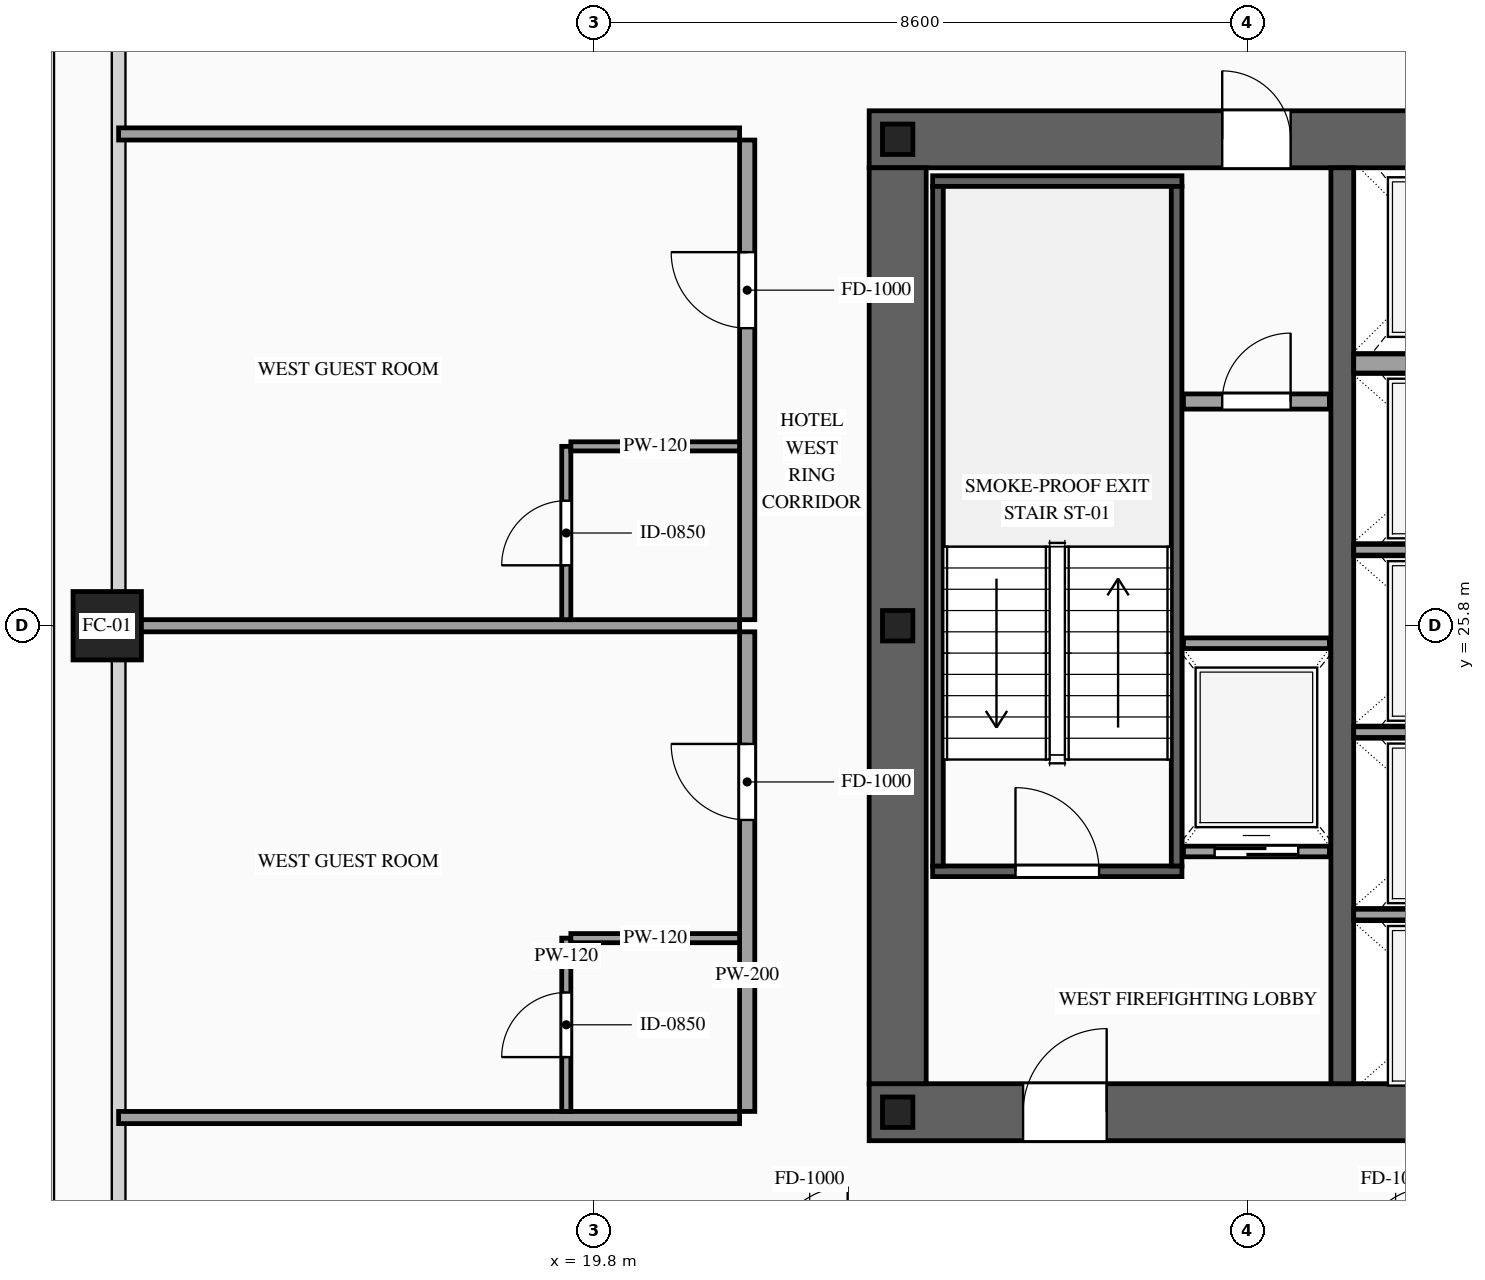
"""IFC4 building model, lengths in metres.
Left out: names, types, materials, properties, quantities, classifications, styles, units other than length and angle.
Written with IfcOpenShell. Run it as: python <this file> out.ifc"""

import sys

from ifc_helpers import new_model, si_unit, direction, frame, frame_2d, origin, origin_2d, place, context, subcontext, project, spatial, rectangle, hollow_rectangle, i_section, extrude, source, transform, mapped, element, fill, save


model = new_model("IFC4")
c1 = context("Model", 3, precision=1e-05, world=origin(), true_north=direction((0.0, 1.0)))
c2 = subcontext(c1, "Body", "Model", "MODEL_VIEW")
j1 = project(units=[si_unit("LENGTHUNIT", "METRE"), si_unit("PLANEANGLEUNIT", "RADIAN")], contexts=[c1])
p1 = place(None, origin())
s1 = spatial("IfcSite", under=j1, at=p1, CompositionType="ELEMENT")
p2 = place(p1, origin())
s2 = spatial("IfcBuilding", under=s1, at=p2, CompositionType="ELEMENT")
p3 = place(p2, frame((0.0, 0.0, 138.0)))
s3 = spatial("IfcBuildingStorey", under=s2, at=p3, CompositionType="ELEMENT", Elevation=138.0)
p4 = place(p3, frame((23.425, 19.4, 0.0), z_axis=(0.0, 0.0, 1.0), x_axis=(1.0, 0.0, 0.0)))
e1 = element("IfcWall", 1, at=p4, inside=s3, PredefinedType="SHEAR", context=c2, shape_type="SweptSolid", body=[
    extrude(rectangle(XDim=27.15, YDim=0.75, at=frame_2d((13.575, 0.0))), origin(), (0.0, 0.0, 1.0), 3.6),
])
p5 = place(p4, frame((2.025, 0.0, 0.0)))
e2 = element("IfcOpeningElement", 2, at=p5, cuts=e1, PredefinedType="OPENING", context=c2, shape_type="SweptSolid", body=[
    extrude(rectangle(XDim=1.1, YDim=2.2, at=frame_2d((0.55, 1.1))), frame((0.0, 0.39, 0.0), z_axis=(0.0, -1.0, 0.0), x_axis=(1.0, 0.0, 0.0)), (0.0, 0.0, 1.0), 0.78),
])
p6 = place(p4, frame((9.925, 0.0, 0.0)))
e3 = element("IfcOpeningElement", 3, at=p6, cuts=e1, PredefinedType="OPENING", context=c2, shape_type="SweptSolid", body=[
    extrude(rectangle(XDim=1.1, YDim=2.2, at=frame_2d((0.55, 1.1))), frame((0.0, 0.39, 0.0), z_axis=(0.0, -1.0, 0.0), x_axis=(1.0, 0.0, 0.0)), (0.0, 0.0, 1.0), 0.78),
])
p7 = place(p4, frame((23.125, 0.0, 0.0)))
e4 = element("IfcOpeningElement", 4, at=p7, cuts=e1, PredefinedType="OPENING", context=c2, shape_type="SweptSolid", body=[
    extrude(rectangle(XDim=1.1, YDim=2.2, at=frame_2d((0.55, 1.1))), frame((0.0, 0.39, 0.0), z_axis=(0.0, -1.0, 0.0), x_axis=(1.0, 0.0, 0.0)), (0.0, 0.0, 1.0), 0.78),
])
p8 = place(p4, frame((19.745, 0.0, 0.0)))
e5 = element("IfcOpeningElement", 5, at=p8, cuts=e1, PredefinedType="OPENING", context=c2, shape_type="SweptSolid", body=[
    extrude(rectangle(XDim=0.9, YDim=2.15, at=frame_2d((0.45, 1.075))), frame((0.0, 0.39, 0.0), z_axis=(0.0, -1.0, 0.0), x_axis=(1.0, 0.0, 0.0)), (0.0, 0.0, 1.0), 0.78),
])
p9 = place(p4, frame((18.305, 0.0, 0.0)))
e6 = element("IfcOpeningElement", 6, at=p9, cuts=e1, PredefinedType="OPENING", context=c2, shape_type="SweptSolid", body=[
    extrude(rectangle(XDim=0.9, YDim=2.15, at=frame_2d((0.45, 1.075))), frame((0.0, 0.39, 0.0), z_axis=(0.0, -1.0, 0.0), x_axis=(1.0, 0.0, 0.0)), (0.0, 0.0, 1.0), 0.78),
])
p10 = place(p3, frame((23.425, 32.2, 0.0), z_axis=(0.0, 0.0, 1.0), x_axis=(1.0, 0.0, 0.0)))
e7 = element("IfcWall", 7, at=p10, inside=s3, PredefinedType="SHEAR", context=c2, shape_type="SweptSolid", body=[
    extrude(rectangle(XDim=27.15, YDim=0.75, at=frame_2d((13.575, 0.0))), origin(), (0.0, 0.0, 1.0), 3.6),
])
p11 = place(p10, frame((4.645, 0.0, 0.0)))
e8 = element("IfcOpeningElement", 8, at=p11, cuts=e7, PredefinedType="OPENING", context=c2, shape_type="SweptSolid", body=[
    extrude(rectangle(XDim=0.9, YDim=2.15, at=frame_2d((0.45, 1.075))), frame((0.0, 0.39, 0.0), z_axis=(0.0, -1.0, 0.0), x_axis=(1.0, 0.0, 0.0)), (0.0, 0.0, 1.0), 0.78),
])
p12 = place(p10, frame((9.925, 0.0, 0.0)))
e9 = element("IfcOpeningElement", 9, at=p12, cuts=e7, PredefinedType="OPENING", context=c2, shape_type="SweptSolid", body=[
    extrude(rectangle(XDim=1.1, YDim=2.2, at=frame_2d((0.55, 1.1))), frame((0.0, 0.39, 0.0), z_axis=(0.0, -1.0, 0.0), x_axis=(1.0, 0.0, 0.0)), (0.0, 0.0, 1.0), 0.78),
])
p13 = place(p10, frame((15.775, 0.0, 0.0)))
e10 = element("IfcOpeningElement", 10, at=p13, cuts=e7, PredefinedType="OPENING", context=c2, shape_type="SweptSolid", body=[
    extrude(rectangle(XDim=1.1, YDim=2.2, at=frame_2d((0.55, 1.1))), frame((0.0, 0.39, 0.0), z_axis=(0.0, -1.0, 0.0), x_axis=(1.0, 0.0, 0.0)), (0.0, 0.0, 1.0), 0.78),
])
p14 = place(p10, frame((18.975, 0.0, 0.0)))
e11 = element("IfcOpeningElement", 11, at=p14, cuts=e7, PredefinedType="OPENING", context=c2, shape_type="SweptSolid", body=[
    extrude(rectangle(XDim=0.9, YDim=2.15, at=frame_2d((0.45, 1.075))), frame((0.0, 0.39, 0.0), z_axis=(0.0, -1.0, 0.0), x_axis=(1.0, 0.0, 0.0)), (0.0, 0.0, 1.0), 0.78),
])
m1 = source(origin(), c2, "Body", "SweptSolid", [
    extrude(rectangle(XDim=12.05, YDim=0.75, at=frame_2d((6.025, 0.0))), origin(), (0.0, 0.0, 1.0), 3.6),
])
p15 = place(p3, frame((23.8, 19.775, 0.0), z_axis=(0.0, 0.0, 1.0), x_axis=(0.0, 1.0, 0.0)))
e12 = element("IfcWall", 12, at=p15, inside=s3, PredefinedType="SHEAR", context=c2, shape_type="MappedRepresentation", body=[
    mapped(m1, transform((0.0, 0.0, 0.0), scale=1.0)),
])
m2 = source(origin(), c2, "Body", "SweptSolid", [
    extrude(rectangle(XDim=12.05, YDim=0.3, at=frame_2d((6.025, 0.0))), origin(), (0.0, 0.0, 1.0), 3.6),
])
p16 = place(p3, frame((29.65, 19.775, 0.0), z_axis=(0.0, 0.0, 1.0), x_axis=(0.0, 1.0, 0.0)))
e13 = element("IfcWall", 13, at=p16, inside=s3, PredefinedType="SOLIDWALL", context=c2, shape_type="MappedRepresentation", body=[
    mapped(m2, transform((0.0, 0.0, 0.0), scale=1.0)),
])
m3 = source(origin(), c2, "Body", "SweptSolid", [
    extrude(i_section(OverallWidth=0.4, OverallDepth=0.4, WebThickness=0.013, FlangeThickness=0.021, at=origin_2d()), origin(), (0.0, 0.0, 1.0), 3.6),
])
for number, where, z_axis, x_axis in (
    (14, (23.8, 19.4, 0.0), (0.0, 0.0, 1.0), (1.0, 0.0, 0.0)),
    (15, (23.8, 25.8, 0.0), (0.0, 0.0, 1.0), (1.0, 0.0, 0.0)),
    (16, (23.8, 32.2, 0.0), (0.0, 0.0, 1.0), (1.0, 0.0, 0.0)),
):
    element("IfcColumn", number, at=place(p3, frame(where, z_axis=z_axis, x_axis=x_axis)), inside=s3, PredefinedType="COLUMN", context=c2, shape_type="MappedRepresentation", body=[
        mapped(m3, transform((0.0, 0.0, 0.0), scale=1.0)),
    ])
m4 = source(origin(), c2, "Body", "SweptSolid", [
    extrude(hollow_rectangle(XDim=0.9, YDim=0.9, WallThickness=0.042, at=origin_2d()), origin(), (0.0, 0.0, 1.0), 3.6),
])
p17 = place(p3, frame((13.4, 25.8, 0.0), z_axis=(0.0, 0.0, 1.0), x_axis=(1.0, 0.0, 0.0)))
e17 = element("IfcColumn", 17, at=p17, inside=s3, PredefinedType="COLUMN", context=c2, shape_type="MappedRepresentation", body=[
    mapped(m4, transform((0.0, 0.0, 0.0), scale=1.0)),
])
p18 = place(p3, frame((27.56, 22.83, 0.0), z_axis=(0.0, 0.0, 1.0), x_axis=(1.0, 0.0, 0.0)))
e18 = element("IfcWall", 18, at=p18, inside=s3, PredefinedType="SOLIDWALL", context=c2, shape_type="SweptSolid", body=[
    extrude(rectangle(XDim=1.92, YDim=0.14, at=frame_2d((0.96, 0.0))), origin(), (0.0, 0.0, 1.0), 3.38),
])
p19 = place(p18, frame((0.41, 0.0, 0.0)))
e19 = element("IfcOpeningElement", 19, at=p19, cuts=e18, PredefinedType="OPENING", context=c2, shape_type="SweptSolid", body=[
    extrude(rectangle(XDim=1.1, YDim=2.2, at=frame_2d((0.55, 1.1))), frame((0.0, 0.085, 0.0), z_axis=(0.0, -1.0, 0.0), x_axis=(1.0, 0.0, 0.0)), (0.0, 0.0, 1.0), 0.17),
])
m5 = source(origin(), c2, "Body", "SweptSolid", [
    extrude(rectangle(XDim=1.92, YDim=0.14, at=frame_2d((0.96, 0.0))), origin(), (0.0, 0.0, 1.0), 3.38),
])
p20 = place(p3, frame((27.56, 25.57, 0.0), z_axis=(0.0, 0.0, 1.0), x_axis=(1.0, 0.0, 0.0)))
e20 = element("IfcWall", 20, at=p20, inside=s3, PredefinedType="SOLIDWALL", context=c2, shape_type="MappedRepresentation", body=[
    mapped(m5, transform((0.0, 0.0, 0.0), scale=1.0)),
])
m6 = source(origin(), c2, "Body", "SweptSolid", [
    extrude(rectangle(XDim=2.5, YDim=0.14, at=frame_2d((1.25, 0.0))), origin(), (0.0, 0.0, 1.0), 3.38),
])
for number, where, z_axis, x_axis in (
    (21, (29.8, 22.0, 0.0), (0.0, 0.0, 1.0), (1.0, 0.0, 0.0)),
    (22, (29.8, 24.4, 0.0), (0.0, 0.0, 1.0), (1.0, 0.0, 0.0)),
    (23, (29.8, 26.8, 0.0), (0.0, 0.0, 1.0), (1.0, 0.0, 0.0)),
):
    element("IfcWall", number, at=place(p3, frame(where, z_axis=z_axis, x_axis=x_axis)), inside=s3, PredefinedType="SOLIDWALL", context=c2, shape_type="MappedRepresentation", body=[
        mapped(m6, transform((0.0, 0.0, 0.0), scale=1.0)),
    ])
m7 = source(origin(), c2, "Body", "SweptSolid", [
    extrude(rectangle(XDim=2.5, YDim=0.25, at=frame_2d((1.25, 0.0))), origin(), (0.0, 0.0, 1.0), 3.38),
])
p21 = place(p3, frame((29.8, 29.25, 0.0), z_axis=(0.0, 0.0, 1.0), x_axis=(1.0, 0.0, 0.0)))
e24 = element("IfcWall", 24, at=p21, inside=s3, PredefinedType="SOLIDWALL", context=c2, shape_type="MappedRepresentation", body=[
    mapped(m7, transform((0.0, 0.0, 0.0), scale=1.0)),
])
p22 = place(p3, frame((24.26, 22.57, 0.0), z_axis=(0.0, 0.0, 1.0), x_axis=(1.0, 0.0, 0.0)))
e25 = element("IfcWall", 25, at=p22, inside=s3, PredefinedType="SOLIDWALL", context=c2, shape_type="SweptSolid", body=[
    extrude(rectangle(XDim=3.28, YDim=0.14, at=frame_2d((1.64, 0.0))), origin(), (0.0, 0.0, 1.0), 3.38),
])
p23 = place(p22, frame((1.09, 0.0, 0.0)))
e26 = element("IfcOpeningElement", 26, at=p23, cuts=e25, PredefinedType="OPENING", context=c2, shape_type="SweptSolid", body=[
    extrude(rectangle(XDim=1.1, YDim=2.2, at=frame_2d((0.55, 1.1))), frame((0.0, 0.085, 0.0), z_axis=(0.0, -1.0, 0.0), x_axis=(1.0, 0.0, 0.0)), (0.0, 0.0, 1.0), 0.17),
])
m8 = source(origin(), c2, "Body", "SweptSolid", [
    extrude(rectangle(XDim=3.28, YDim=0.14, at=frame_2d((1.64, 0.0))), origin(), (0.0, 0.0, 1.0), 3.38),
])
p24 = place(p3, frame((24.26, 31.65, 0.0), z_axis=(0.0, 0.0, 1.0), x_axis=(1.0, 0.0, 0.0)))
e27 = element("IfcWall", 27, at=p24, inside=s3, PredefinedType="SOLIDWALL", context=c2, shape_type="MappedRepresentation", body=[
    mapped(m8, transform((0.0, 0.0, 0.0), scale=1.0)),
])
m9 = source(origin(), c2, "Body", "SweptSolid", [
    extrude(rectangle(XDim=8.94, YDim=0.14, at=frame_2d((4.47, 0.0))), origin(), (0.0, 0.0, 1.0), 3.38),
])
for number, where, z_axis, x_axis in (
    (28, (24.33, 22.64, 0.0), (0.0, 0.0, 1.0), (0.0, 1.0, 0.0)),
    (29, (27.47, 22.64, 0.0), (0.0, 0.0, 1.0), (0.0, 1.0, 0.0)),
):
    element("IfcWall", number, at=place(p3, frame(where, z_axis=z_axis, x_axis=x_axis)), inside=s3, PredefinedType="SOLIDWALL", context=c2, shape_type="MappedRepresentation", body=[
        mapped(m9, transform((0.0, 0.0, 0.0), scale=1.0)),
    ])
p25 = place(p3, frame((27.56, 28.75, 0.0), z_axis=(0.0, 0.0, 1.0), x_axis=(1.0, 0.0, 0.0)))
e30 = element("IfcWall", 30, at=p25, inside=s3, PredefinedType="PARTITIONING", context=c2, shape_type="SweptSolid", body=[
    extrude(rectangle(XDim=1.92, YDim=0.2, at=frame_2d((0.96, 0.0))), origin(), (0.0, 0.0, 1.0), 3.38),
])
p26 = place(p25, frame((0.51, 0.0, 0.0)))
e31 = element("IfcOpeningElement", 31, at=p26, cuts=e30, PredefinedType="OPENING", context=c2, shape_type="SweptSolid", body=[
    extrude(rectangle(XDim=0.9, YDim=2.15, at=frame_2d((0.45, 1.075))), frame((0.0, 0.115, 0.0), z_axis=(0.0, -1.0, 0.0), x_axis=(1.0, 0.0, 0.0)), (0.0, 0.0, 1.0), 0.23),
])
p27 = place(p3, frame((21.82, 19.41, 0.0), z_axis=(0.0, 0.0, 1.0), x_axis=(0.0, 1.0, 0.0)))
e32 = element("IfcWall", 32, at=p27, inside=s3, PredefinedType="PARTITIONING", context=c2, shape_type="SweptSolid", body=[
    extrude(rectangle(XDim=6.31, YDim=0.2, at=frame_2d((3.155, 0.0))), origin(), (0.0, 0.0, 1.0), 3.38),
])
p28 = place(p27, frame((3.835, 0.0, 0.0)))
e33 = element("IfcOpeningElement", 33, at=p28, cuts=e32, PredefinedType="OPENING", context=c2, shape_type="SweptSolid", body=[
    extrude(rectangle(XDim=1.0, YDim=2.2, at=frame_2d((0.5, 1.1))), frame((0.0, 0.115, 0.0), z_axis=(0.0, -1.0, 0.0), x_axis=(1.0, 0.0, 0.0)), (0.0, 0.0, 1.0), 0.23),
])
m10 = source(origin(), c2, "Body", "SweptSolid", [
    extrude(rectangle(XDim=8.17, YDim=0.16, at=frame_2d((4.085, 0.0))), origin(), (0.0, 0.0, 1.0), 2.675),
])
p29 = place(p3, frame((13.55, 25.8, 0.0), z_axis=(0.0, 0.0, 1.0), x_axis=(1.0, 0.0, 0.0)))
e34 = element("IfcWall", 34, at=p29, inside=s3, PredefinedType="PARTITIONING", context=c2, shape_type="MappedRepresentation", body=[
    mapped(m10, transform((0.0, 0.0, 0.0), scale=1.0)),
])
m11 = source(origin(), c2, "Body", "SweptSolid", [
    extrude(rectangle(XDim=8.17, YDim=0.16, at=frame_2d((4.085, 0.0))), origin(), (0.0, 0.0, 1.0), 2.875),
])
p30 = place(p3, frame((13.55, 19.33, 0.0), z_axis=(0.0, 0.0, 1.0), x_axis=(1.0, 0.0, 0.0)))
e35 = element("IfcWall", 35, at=p30, inside=s3, PredefinedType="PARTITIONING", context=c2, shape_type="MappedRepresentation", body=[
    mapped(m11, transform((0.0, 0.0, 0.0), scale=1.0)),
])
p31 = place(p3, frame((19.44, 19.41, 0.0), z_axis=(0.0, 0.0, 1.0), x_axis=(0.0, 1.0, 0.0)))
e36 = element("IfcWall", 36, at=p31, inside=s3, PredefinedType="PARTITIONING", context=c2, shape_type="SweptSolid", body=[
    extrude(rectangle(XDim=2.28, YDim=0.12, at=frame_2d((1.14, 0.0))), origin(), (0.0, 0.0, 1.0), 3.38),
])
p32 = place(p31, frame((0.715, 0.0, 0.0)))
e37 = element("IfcOpeningElement", 37, at=p32, cuts=e36, PredefinedType="OPENING", context=c2, shape_type="SweptSolid", body=[
    extrude(rectangle(XDim=0.85, YDim=2.1, at=frame_2d((0.425, 1.05))), frame((0.0, 0.075, 0.0), z_axis=(0.0, -1.0, 0.0), x_axis=(1.0, 0.0, 0.0)), (0.0, 0.0, 1.0), 0.15),
])
m12 = source(origin(), c2, "Body", "SweptSolid", [
    extrude(rectangle(XDim=2.22, YDim=0.12, at=frame_2d((1.11, 0.0))), origin(), (0.0, 0.0, 1.0), 3.38),
])
p33 = place(p3, frame((19.5, 21.69, 0.0), z_axis=(0.0, 0.0, 1.0), x_axis=(1.0, 0.0, 0.0)))
e38 = element("IfcWall", 38, at=p33, inside=s3, PredefinedType="PARTITIONING", context=c2, shape_type="MappedRepresentation", body=[
    mapped(m12, transform((0.0, 0.0, 0.0), scale=1.0)),
])
p34 = place(p3, frame((21.82, 25.88, 0.0), z_axis=(0.0, 0.0, 1.0), x_axis=(0.0, 1.0, 0.0)))
e39 = element("IfcWall", 39, at=p34, inside=s3, PredefinedType="PARTITIONING", context=c2, shape_type="SweptSolid", body=[
    extrude(rectangle(XDim=6.31, YDim=0.2, at=frame_2d((3.155, 0.0))), origin(), (0.0, 0.0, 1.0), 3.38),
])
p35 = place(p34, frame((3.835, 0.0, 0.0)))
e40 = element("IfcOpeningElement", 40, at=p35, cuts=e39, PredefinedType="OPENING", context=c2, shape_type="SweptSolid", body=[
    extrude(rectangle(XDim=1.0, YDim=2.2, at=frame_2d((0.5, 1.1))), frame((0.0, 0.115, 0.0), z_axis=(0.0, -1.0, 0.0), x_axis=(1.0, 0.0, 0.0)), (0.0, 0.0, 1.0), 0.23),
])
p36 = place(p3, frame((13.55, 32.27, 0.0), z_axis=(0.0, 0.0, 1.0), x_axis=(1.0, 0.0, 0.0)))
e41 = element("IfcWall", 41, at=p36, inside=s3, PredefinedType="PARTITIONING", context=c2, shape_type="MappedRepresentation", body=[
    mapped(m11, transform((0.0, 0.0, 0.0), scale=1.0)),
])
p37 = place(p3, frame((19.44, 25.88, 0.0), z_axis=(0.0, 0.0, 1.0), x_axis=(0.0, 1.0, 0.0)))
e42 = element("IfcWall", 42, at=p37, inside=s3, PredefinedType="PARTITIONING", context=c2, shape_type="SweptSolid", body=[
    extrude(rectangle(XDim=2.28, YDim=0.12, at=frame_2d((1.14, 0.0))), origin(), (0.0, 0.0, 1.0), 3.38),
])
p38 = place(p37, frame((0.715, 0.0, 0.0)))
e43 = element("IfcOpeningElement", 43, at=p38, cuts=e42, PredefinedType="OPENING", context=c2, shape_type="SweptSolid", body=[
    extrude(rectangle(XDim=0.85, YDim=2.1, at=frame_2d((0.425, 1.05))), frame((0.0, 0.075, 0.0), z_axis=(0.0, -1.0, 0.0), x_axis=(1.0, 0.0, 0.0)), (0.0, 0.0, 1.0), 0.15),
])
p39 = place(p3, frame((19.5, 28.16, 0.0), z_axis=(0.0, 0.0, 1.0), x_axis=(1.0, 0.0, 0.0)))
e44 = element("IfcWall", 44, at=p39, inside=s3, PredefinedType="PARTITIONING", context=c2, shape_type="MappedRepresentation", body=[
    mapped(m12, transform((0.0, 0.0, 0.0), scale=1.0)),
])
m13 = source(origin(), c2, "Body", "SweptSolid", [
    extrude(rectangle(XDim=1.1, YDim=2.2, at=frame_2d((0.55, 1.1))), frame((0.0, 0.025, 0.0), z_axis=(0.0, -1.0, 0.0), x_axis=(1.0, 0.0, 0.0)), (0.0, 0.0, 1.0), 0.05),
])
p40 = place(p19, origin())
e45 = element("IfcDoor", 45, at=p40, inside=s3, OperationType="SLIDING_TO_LEFT", PredefinedType="DOOR", context=c2, shape_type="MappedRepresentation", body=[
    mapped(m13, transform((0.0, 0.0, 0.0), scale=1.0)),
])
fill(e19, e45)
m14 = source(origin(), c2, "Body", "SweptSolid", [
    extrude(rectangle(XDim=1.1, YDim=2.2, at=frame_2d((0.55, 1.1))), frame((0.0, 0.025, 0.0), z_axis=(0.0, -1.0, 0.0), x_axis=(1.0, 0.0, 0.0)), (0.0, 0.0, 1.0), 0.05),
])
p41 = place(p23, origin())
e46 = element("IfcDoor", 46, at=p41, inside=s3, OperationType="SINGLE_SWING_LEFT", PredefinedType="DOOR", context=c2, shape_type="MappedRepresentation", body=[
    mapped(m14, transform((0.0, 0.0, 0.0), scale=1.0)),
])
fill(e26, e46)
p42 = place(p5, origin())
e47 = element("IfcDoor", 47, at=p42, inside=s3, OperationType="SINGLE_SWING_RIGHT", PredefinedType="DOOR", context=c2, shape_type="MappedRepresentation", body=[
    mapped(m14, transform((0.0, 0.0, 0.0), scale=1.0)),
])
fill(e2, e47)
m15 = source(origin(), c2, "Body", "SweptSolid", [
    extrude(rectangle(XDim=0.9, YDim=2.15, at=frame_2d((0.45, 1.075))), frame((0.0, 0.025, 0.0), z_axis=(0.0, -1.0, 0.0), x_axis=(1.0, 0.0, 0.0)), (0.0, 0.0, 1.0), 0.05),
])
p43 = place(p11, origin())
e48 = element("IfcDoor", 48, at=p43, inside=s3, OperationType="SINGLE_SWING_LEFT", PredefinedType="DOOR", context=c2, shape_type="MappedRepresentation", body=[
    mapped(m15, transform((0.0, 0.0, 0.0), scale=1.0)),
])
fill(e8, e48)
p44 = place(p26, origin())
e49 = element("IfcDoor", 49, at=p44, inside=s3, OperationType="SINGLE_SWING_RIGHT", PredefinedType="DOOR", context=c2, shape_type="MappedRepresentation", body=[
    mapped(m15, transform((0.0, 0.0, 0.0), scale=1.0)),
])
fill(e31, e49)
m16 = source(origin(), c2, "Body", "SweptSolid", [
    extrude(rectangle(XDim=1.0, YDim=2.2, at=frame_2d((0.5, 1.1))), frame((0.0, 0.025, 0.0), z_axis=(0.0, -1.0, 0.0), x_axis=(1.0, 0.0, 0.0)), (0.0, 0.0, 1.0), 0.05),
])
p45 = place(p28, origin())
e50 = element("IfcDoor", 50, at=p45, inside=s3, OperationType="SINGLE_SWING_RIGHT", PredefinedType="DOOR", context=c2, shape_type="MappedRepresentation", body=[
    mapped(m16, transform((0.0, 0.0, 0.0), scale=1.0)),
])
fill(e33, e50)
m17 = source(origin(), c2, "Body", "SweptSolid", [
    extrude(rectangle(XDim=0.85, YDim=2.1, at=frame_2d((0.425, 1.05))), frame((0.0, 0.025, 0.0), z_axis=(0.0, -1.0, 0.0), x_axis=(1.0, 0.0, 0.0)), (0.0, 0.0, 1.0), 0.05),
])
p46 = place(p32, origin())
e51 = element("IfcDoor", 51, at=p46, inside=s3, OperationType="SINGLE_SWING_LEFT", PredefinedType="DOOR", context=c2, shape_type="MappedRepresentation", body=[
    mapped(m17, transform((0.0, 0.0, 0.0), scale=1.0)),
])
fill(e37, e51)
p47 = place(p35, origin())
e52 = element("IfcDoor", 52, at=p47, inside=s3, OperationType="SINGLE_SWING_RIGHT", PredefinedType="DOOR", context=c2, shape_type="MappedRepresentation", body=[
    mapped(m16, transform((0.0, 0.0, 0.0), scale=1.0)),
])
fill(e40, e52)
p48 = place(p38, origin())
e53 = element("IfcDoor", 53, at=p48, inside=s3, OperationType="SINGLE_SWING_LEFT", PredefinedType="DOOR", context=c2, shape_type="MappedRepresentation", body=[
    mapped(m17, transform((0.0, 0.0, 0.0), scale=1.0)),
])
fill(e43, e53)
save(model, sys.argv[1])
